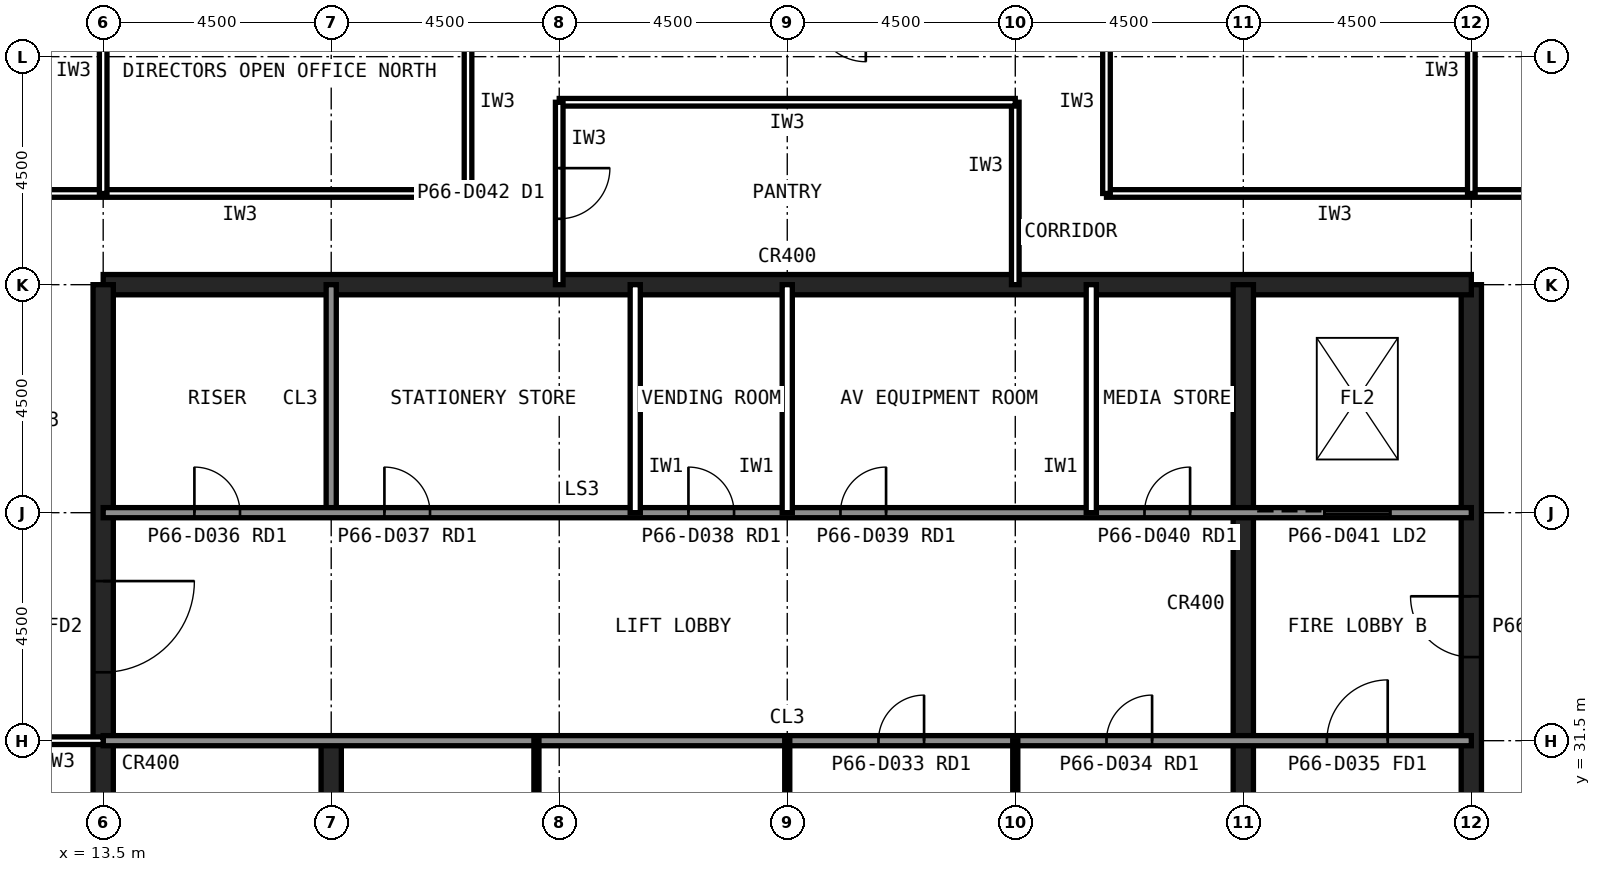
"""IFC4 building model, lengths in metres.
Left out: names, types, materials, properties, quantities, classifications, styles, units other than length and angle.
Written with IfcOpenShell. Run it as: python <this file> out.ifc"""

import sys

from ifc_helpers import new_model, si_unit, direction, frame, frame_2d, origin, place, context, subcontext, project, spatial, rectangle, extrude, element, fill, save


model = new_model("IFC4")
c1 = context("Model", 3, precision=1e-05, world=origin(), true_north=direction((0.0, 1.0)))
c2 = subcontext(c1, "Body", "Model", "MODEL_VIEW")
j1 = project(units=[si_unit("LENGTHUNIT", "METRE"), si_unit("PLANEANGLEUNIT", "RADIAN")], contexts=[c1])
p1 = place(None, origin())
s1 = spatial("IfcSite", under=j1, at=p1, CompositionType="ELEMENT")
p2 = place(p1, origin())
s2 = spatial("IfcBuilding", under=s1, at=p2, CompositionType="ELEMENT")
p3 = place(p2, frame((0.0, 0.0, 278.6)))
s3 = spatial("IfcBuildingStorey", under=s2, at=p3, CompositionType="ELEMENT", Elevation=278.6)
p4 = place(p3, frame((40.5, 13.5, 0.0), z_axis=(0.0, 0.0, 1.0), x_axis=(0.0, 1.0, 0.0)))
e1 = element("IfcWall", 1, at=p4, inside=s3, PredefinedType="SHEAR", context=c2, shape_type="SweptSolid", body=[
    extrude(rectangle(XDim=27.0, YDim=0.4, at=frame_2d((13.5, 0.0))), origin(), (0.0, 0.0, 1.0), 4.0),
])
p5 = place(p4, frame((5.85, 0.0, 0.0)))
e2 = element("IfcOpeningElement", 2, at=p5, cuts=e1, PredefinedType="OPENING", context=c2, shape_type="SweptSolid", body=[
    extrude(rectangle(XDim=1.8, YDim=2.1, at=frame_2d((0.9, 1.05))), frame((0.0, 0.21, 0.0), z_axis=(0.0, -1.0, 0.0), x_axis=(1.0, 0.0, 0.0)), (0.0, 0.0, 1.0), 0.42),
])
p6 = place(p4, frame((19.65, 0.0, 0.0)))
e3 = element("IfcOpeningElement", 3, at=p6, cuts=e1, PredefinedType="OPENING", context=c2, shape_type="SweptSolid", body=[
    extrude(rectangle(XDim=1.2, YDim=2.1, at=frame_2d((0.6, 1.05))), frame((0.0, 0.21, 0.0), z_axis=(0.0, -1.0, 0.0), x_axis=(1.0, 0.0, 0.0)), (0.0, 0.0, 1.0), 0.42),
])
p7 = place(p3, frame((40.5, 40.5, 0.0), z_axis=(0.0, 0.0, 1.0), x_axis=(-1.0, 0.0, 0.0)))
e4 = element("IfcWall", 4, at=p7, inside=s3, PredefinedType="SHEAR", context=c2, shape_type="SweptSolid", body=[
    extrude(rectangle(XDim=27.0, YDim=0.4, at=frame_2d((13.5, 0.0))), origin(), (0.0, 0.0, 1.0), 4.0),
])
p8 = place(p3, frame((13.5, 40.5, 0.0), z_axis=(0.0, 0.0, 1.0), x_axis=(0.0, -1.0, 0.0)))
e5 = element("IfcWall", 5, at=p8, inside=s3, PredefinedType="SHEAR", context=c2, shape_type="SweptSolid", body=[
    extrude(rectangle(XDim=27.0, YDim=0.4, at=frame_2d((13.5, 0.0))), origin(), (0.0, 0.0, 1.0), 4.0),
])
p9 = place(p8, frame((19.65, 0.0, 0.0)))
e6 = element("IfcOpeningElement", 6, at=p9, cuts=e5, PredefinedType="OPENING", context=c2, shape_type="SweptSolid", body=[
    extrude(rectangle(XDim=1.2, YDim=2.1, at=frame_2d((0.6, 1.05))), frame((0.0, 0.21, 0.0), z_axis=(0.0, -1.0, 0.0), x_axis=(1.0, 0.0, 0.0)), (0.0, 0.0, 1.0), 0.42),
])
p10 = place(p8, frame((5.85, 0.0, 0.0)))
e7 = element("IfcOpeningElement", 7, at=p10, cuts=e5, PredefinedType="OPENING", context=c2, shape_type="SweptSolid", body=[
    extrude(rectangle(XDim=1.8, YDim=2.1, at=frame_2d((0.9, 1.05))), frame((0.0, 0.21, 0.0), z_axis=(0.0, -1.0, 0.0), x_axis=(1.0, 0.0, 0.0)), (0.0, 0.0, 1.0), 0.42),
])
p11 = place(p3, frame((18.0, 13.5, 0.0), z_axis=(0.0, 0.0, 1.0), x_axis=(0.0, 1.0, 0.0)))
e8 = element("IfcWall", 8, at=p11, inside=s3, PredefinedType="SHEAR", context=c2, shape_type="SweptSolid", body=[
    extrude(rectangle(XDim=18.0, YDim=0.4, at=frame_2d((9.0, 0.0))), origin(), (0.0, 0.0, 1.0), 4.0),
])
p12 = place(p3, frame((18.0, 36.0, 0.0), z_axis=(0.0, 0.0, 1.0), x_axis=(0.0, 1.0, 0.0)))
e9 = element("IfcWall", 9, at=p12, inside=s3, PredefinedType="SOLIDWALL", context=c2, shape_type="SweptSolid", body=[
    extrude(rectangle(XDim=4.5, YDim=0.2, at=frame_2d((2.25, 0.0))), origin(), (0.0, 0.0, 1.0), 3.84),
])
p13 = place(p3, frame((36.0, 22.5, 0.0), z_axis=(0.0, 0.0, 1.0), x_axis=(0.0, 1.0, 0.0)))
e10 = element("IfcWall", 10, at=p13, inside=s3, PredefinedType="SHEAR", context=c2, shape_type="SweptSolid", body=[
    extrude(rectangle(XDim=18.0, YDim=0.4, at=frame_2d((9.0, 0.0))), origin(), (0.0, 0.0, 1.0), 4.0),
])
p14 = place(p3, frame((13.5, 36.0, 0.0), z_axis=(0.0, 0.0, 1.0), x_axis=(1.0, 0.0, 0.0)))
e11 = element("IfcWall", 11, at=p14, inside=s3, PredefinedType="SOLIDWALL", context=c2, shape_type="SweptSolid", body=[
    extrude(rectangle(XDim=27.0, YDim=0.2, at=frame_2d((13.5, 0.0))), origin(), (0.0, 0.0, 1.0), 3.84),
])
p15 = place(p14, frame((1.8, 0.0, 0.0)))
e12 = element("IfcOpeningElement", 12, at=p15, cuts=e11, PredefinedType="OPENING", context=c2, shape_type="SweptSolid", body=[
    extrude(rectangle(XDim=0.9, YDim=2.1, at=frame_2d((0.45, 1.05))), frame((0.0, 0.11, 0.0), z_axis=(0.0, -1.0, 0.0), x_axis=(1.0, 0.0, 0.0)), (0.0, 0.0, 1.0), 0.22),
])
p16 = place(p14, frame((5.55, 0.0, 0.0)))
e13 = element("IfcOpeningElement", 13, at=p16, cuts=e11, PredefinedType="OPENING", context=c2, shape_type="SweptSolid", body=[
    extrude(rectangle(XDim=0.9, YDim=2.1, at=frame_2d((0.45, 1.05))), frame((0.0, 0.11, 0.0), z_axis=(0.0, -1.0, 0.0), x_axis=(1.0, 0.0, 0.0)), (0.0, 0.0, 1.0), 0.22),
])
p17 = place(p14, frame((11.55, 0.0, 0.0)))
e14 = element("IfcOpeningElement", 14, at=p17, cuts=e11, PredefinedType="OPENING", context=c2, shape_type="SweptSolid", body=[
    extrude(rectangle(XDim=0.9, YDim=2.1, at=frame_2d((0.45, 1.05))), frame((0.0, 0.11, 0.0), z_axis=(0.0, -1.0, 0.0), x_axis=(1.0, 0.0, 0.0)), (0.0, 0.0, 1.0), 0.22),
])
p18 = place(p14, frame((14.55, 0.0, 0.0)))
e15 = element("IfcOpeningElement", 15, at=p18, cuts=e11, PredefinedType="OPENING", context=c2, shape_type="SweptSolid", body=[
    extrude(rectangle(XDim=0.9, YDim=2.1, at=frame_2d((0.45, 1.05))), frame((0.0, 0.11, 0.0), z_axis=(0.0, -1.0, 0.0), x_axis=(1.0, 0.0, 0.0)), (0.0, 0.0, 1.0), 0.22),
])
p19 = place(p14, frame((20.55, 0.0, 0.0)))
e16 = element("IfcOpeningElement", 16, at=p19, cuts=e11, PredefinedType="OPENING", context=c2, shape_type="SweptSolid", body=[
    extrude(rectangle(XDim=0.9, YDim=2.1, at=frame_2d((0.45, 1.05))), frame((0.0, 0.11, 0.0), z_axis=(0.0, -1.0, 0.0), x_axis=(1.0, 0.0, 0.0)), (0.0, 0.0, 1.0), 0.22),
])
p20 = place(p14, frame((24.1, 0.0, 0.0)))
e17 = element("IfcOpeningElement", 17, at=p20, cuts=e11, PredefinedType="OPENING", context=c2, shape_type="SweptSolid", body=[
    extrude(rectangle(XDim=1.3, YDim=2.2, at=frame_2d((0.65, 1.1))), frame((0.0, 0.11, 0.0), z_axis=(0.0, -1.0, 0.0), x_axis=(1.0, 0.0, 0.0)), (0.0, 0.0, 1.0), 0.22),
])
p21 = place(p3, frame((13.5, 31.5, 0.0), z_axis=(0.0, 0.0, 1.0), x_axis=(1.0, 0.0, 0.0)))
e18 = element("IfcWall", 18, at=p21, inside=s3, PredefinedType="SOLIDWALL", context=c2, shape_type="SweptSolid", body=[
    extrude(rectangle(XDim=27.0, YDim=0.2, at=frame_2d((13.5, 0.0))), origin(), (0.0, 0.0, 1.0), 3.84),
])
p22 = place(p21, frame((24.15, 0.0, 0.0)))
e19 = element("IfcOpeningElement", 19, at=p22, cuts=e18, PredefinedType="OPENING", context=c2, shape_type="SweptSolid", body=[
    extrude(rectangle(XDim=1.2, YDim=2.1, at=frame_2d((0.6, 1.05))), frame((0.0, 0.11, 0.0), z_axis=(0.0, -1.0, 0.0), x_axis=(1.0, 0.0, 0.0)), (0.0, 0.0, 1.0), 0.22),
])
p23 = place(p21, frame((15.3, 0.0, 0.0)))
e20 = element("IfcOpeningElement", 20, at=p23, cuts=e18, PredefinedType="OPENING", context=c2, shape_type="SweptSolid", body=[
    extrude(rectangle(XDim=0.9, YDim=2.1, at=frame_2d((0.45, 1.05))), frame((0.0, 0.11, 0.0), z_axis=(0.0, -1.0, 0.0), x_axis=(1.0, 0.0, 0.0)), (0.0, 0.0, 1.0), 0.22),
])
p24 = place(p21, frame((19.8, 0.0, 0.0)))
e21 = element("IfcOpeningElement", 21, at=p24, cuts=e18, PredefinedType="OPENING", context=c2, shape_type="SweptSolid", body=[
    extrude(rectangle(XDim=0.9, YDim=2.1, at=frame_2d((0.45, 1.05))), frame((0.0, 0.11, 0.0), z_axis=(0.0, -1.0, 0.0), x_axis=(1.0, 0.0, 0.0)), (0.0, 0.0, 1.0), 0.22),
])
for number, where, z_axis, x_axis in (
    (22, (24.0, 36.0, 0.0), (0.0, 0.0, 1.0), (0.0, 1.0, 0.0)),
    (23, (27.0, 36.0, 0.0), (0.0, 0.0, 1.0), (0.0, 1.0, 0.0)),
    (24, (33.0, 36.0, 0.0), (0.0, 0.0, 1.0), (0.0, 1.0, 0.0)),
):
    element("IfcWall", number, at=place(p3, frame(where, z_axis=z_axis, x_axis=x_axis)), inside=s3, PredefinedType="PARTITIONING", context=c2, shape_type="SweptSolid", body=[
        extrude(rectangle(XDim=4.5, YDim=0.2, at=frame_2d((2.25, 0.0))), origin(), (0.0, 0.0, 1.0), 3.84),
    ])
for number, where, z_axis, x_axis in (
    (25, (22.05, 22.5, 0.0), (0.0, 0.0, 1.0), (0.0, 1.0, 0.0)),
    (26, (27.0, 22.5, 0.0), (0.0, 0.0, 1.0), (0.0, 1.0, 0.0)),
    (27, (31.5, 22.5, 0.0), (0.0, 0.0, 1.0), (0.0, 1.0, 0.0)),
):
    element("IfcWall", number, at=place(p3, frame(where, z_axis=z_axis, x_axis=x_axis)), inside=s3, PredefinedType="PLUMBINGWALL", context=c2, shape_type="SweptSolid", body=[
        extrude(rectangle(XDim=9.0, YDim=0.1, at=frame_2d((4.5, 0.0))), origin(), (0.0, 0.0, 1.0), 3.84),
    ])
for number, where, z_axis, x_axis in (
    (28, (20.7, 42.3, 0.0), (0.0, 0.0, 1.0), (-1.0, 0.0, 0.0)),
    (29, (42.3, 42.3, 0.0), (0.0, 0.0, 1.0), (-1.0, 0.0, 0.0)),
):
    element("IfcWall", number, at=place(p3, frame(where, z_axis=z_axis, x_axis=x_axis)), inside=s3, PredefinedType="PARTITIONING", context=c2, shape_type="SweptSolid", body=[
        extrude(rectangle(XDim=9.0, YDim=0.15, at=frame_2d((4.5, 0.0))), origin(), (0.0, 0.0, 1.0), 3.84),
    ])
for number, where, z_axis, x_axis in (
    (30, (20.7, 45.9, 0.0), (0.0, 0.0, 1.0), (0.0, -1.0, 0.0)),
    (31, (33.3, 42.3, 0.0), (0.0, 0.0, 1.0), (0.0, 1.0, 0.0)),
):
    element("IfcWall", number, at=place(p3, frame(where, z_axis=z_axis, x_axis=x_axis)), inside=s3, PredefinedType="PARTITIONING", context=c2, shape_type="SweptSolid", body=[
        extrude(rectangle(XDim=3.6, YDim=0.15, at=frame_2d((1.8, 0.0))), origin(), (0.0, 0.0, 1.0), 3.84),
    ])
p25 = place(p3, frame((13.5, 31.5, 0.0), z_axis=(0.0, 0.0, 1.0), x_axis=(-1.0, 0.0, 0.0)))
e32 = element("IfcWall", 32, at=p25, inside=s3, PredefinedType="PARTITIONING", context=c2, shape_type="SweptSolid", body=[
    extrude(rectangle(XDim=4.5, YDim=0.15, at=frame_2d((2.25, 0.0))), origin(), (0.0, 0.0, 1.0), 2.989),
])
p26 = place(p25, frame((1.75, 0.0, 0.0)))
e33 = element("IfcOpeningElement", 33, at=p26, cuts=e32, PredefinedType="OPENING", context=c2, shape_type="SweptSolid", body=[
    extrude(rectangle(XDim=1.0, YDim=2.1, at=frame_2d((0.5, 1.05))), frame((0.0, 0.085, 0.0), z_axis=(0.0, -1.0, 0.0), x_axis=(1.0, 0.0, 0.0)), (0.0, 0.0, 1.0), 0.17),
])
p27 = place(p3, frame((31.5, 40.5, 0.0), z_axis=(0.0, 0.0, 1.0), x_axis=(0.0, 1.0, 0.0)))
e34 = element("IfcWall", 34, at=p27, inside=s3, PredefinedType="PARTITIONING", context=c2, shape_type="SweptSolid", body=[
    extrude(rectangle(XDim=3.6, YDim=0.15, at=frame_2d((1.8, 0.0))), origin(), (0.0, 0.0, 1.0), 2.989),
])
p28 = place(p3, frame((31.5, 44.1, 0.0), z_axis=(0.0, 0.0, 1.0), x_axis=(-1.0, 0.0, 0.0)))
e35 = element("IfcWall", 35, at=p28, inside=s3, PredefinedType="PARTITIONING", context=c2, shape_type="SweptSolid", body=[
    extrude(rectangle(XDim=9.0, YDim=0.15, at=frame_2d((4.5, 0.0))), origin(), (0.0, 0.0, 1.0), 3.84),
])
p29 = place(p3, frame((22.5, 44.1, 0.0), z_axis=(0.0, 0.0, 1.0), x_axis=(0.0, -1.0, 0.0)))
e36 = element("IfcWall", 36, at=p29, inside=s3, PredefinedType="PARTITIONING", context=c2, shape_type="SweptSolid", body=[
    extrude(rectangle(XDim=3.6, YDim=0.15, at=frame_2d((1.8, 0.0))), origin(), (0.0, 0.0, 1.0), 2.989),
])
p30 = place(p29, frame((1.3, 0.0, 0.0)))
e37 = element("IfcOpeningElement", 37, at=p30, cuts=e36, PredefinedType="OPENING", context=c2, shape_type="SweptSolid", body=[
    extrude(rectangle(XDim=1.0, YDim=2.1, at=frame_2d((0.5, 1.05))), frame((0.0, 0.085, 0.0), z_axis=(0.0, -1.0, 0.0), x_axis=(1.0, 0.0, 0.0)), (0.0, 0.0, 1.0), 0.17),
])
p31 = place(p3, frame((13.5, 42.3, 0.0), z_axis=(0.0, 0.0, 1.0), x_axis=(0.0, 1.0, 0.0)))
e38 = element("IfcWall", 38, at=p31, inside=s3, PredefinedType="PARTITIONING", context=c2, shape_type="SweptSolid", body=[
    extrude(rectangle(XDim=6.88, YDim=0.15, at=frame_2d((3.44, 0.0))), origin(), (0.0, 0.0, 1.0), 2.989),
])
p32 = place(p31, frame((2.94, 0.0, 0.0)))
e39 = element("IfcOpeningElement", 39, at=p32, cuts=e38, PredefinedType="OPENING", context=c2, shape_type="SweptSolid", body=[
    extrude(rectangle(XDim=1.0, YDim=2.1, at=frame_2d((0.5, 1.05))), frame((0.0, 0.085, 0.0), z_axis=(0.0, -1.0, 0.0), x_axis=(1.0, 0.0, 0.0)), (0.0, 0.0, 1.0), 0.17),
])
p33 = place(p3, frame((40.5, 42.3, 0.0), z_axis=(0.0, 0.0, 1.0), x_axis=(0.0, 1.0, 0.0)))
e40 = element("IfcWall", 40, at=p33, inside=s3, PredefinedType="PARTITIONING", context=c2, shape_type="SweptSolid", body=[
    extrude(rectangle(XDim=6.88, YDim=0.15, at=frame_2d((3.44, 0.0))), origin(), (0.0, 0.0, 1.0), 2.989),
])
p34 = place(p33, frame((2.94, 0.0, 0.0)))
e41 = element("IfcOpeningElement", 41, at=p34, cuts=e40, PredefinedType="OPENING", context=c2, shape_type="SweptSolid", body=[
    extrude(rectangle(XDim=1.0, YDim=2.1, at=frame_2d((0.5, 1.05))), frame((0.0, 0.085, 0.0), z_axis=(0.0, -1.0, 0.0), x_axis=(1.0, 0.0, 0.0)), (0.0, 0.0, 1.0), 0.17),
])
p35 = place(p10, origin())
e42 = element("IfcDoor", 42, at=p35, inside=s3, OperationType="SINGLE_SWING_LEFT", PredefinedType="DOOR", context=c2, shape_type="SweptSolid", body=[
    extrude(rectangle(XDim=1.8, YDim=2.1, at=frame_2d((0.9, 1.05))), frame((0.0, 0.025, 0.0), z_axis=(0.0, -1.0, 0.0), x_axis=(1.0, 0.0, 0.0)), (0.0, 0.0, 1.0), 0.05),
])
fill(e7, e42)
p36 = place(p6, origin())
e43 = element("IfcDoor", 43, at=p36, inside=s3, OperationType="SINGLE_SWING_RIGHT", PredefinedType="DOOR", context=c2, shape_type="SweptSolid", body=[
    extrude(rectangle(XDim=1.2, YDim=2.1, at=frame_2d((0.6, 1.05))), frame((0.0, 0.025, 0.0), z_axis=(0.0, -1.0, 0.0), x_axis=(1.0, 0.0, 0.0)), (0.0, 0.0, 1.0), 0.05),
])
fill(e3, e43)
p37 = place(p22, origin())
e44 = element("IfcDoor", 44, at=p37, inside=s3, OperationType="SINGLE_SWING_RIGHT", PredefinedType="DOOR", context=c2, shape_type="SweptSolid", body=[
    extrude(rectangle(XDim=1.2, YDim=2.1, at=frame_2d((0.6, 1.05))), frame((0.0, 0.025, 0.0), z_axis=(0.0, -1.0, 0.0), x_axis=(1.0, 0.0, 0.0)), (0.0, 0.0, 1.0), 0.05),
])
fill(e19, e44)
p38 = place(p23, origin())
e45 = element("IfcDoor", 45, at=p38, inside=s3, OperationType="SINGLE_SWING_RIGHT", PredefinedType="DOOR", context=c2, shape_type="SweptSolid", body=[
    extrude(rectangle(XDim=0.9, YDim=2.1, at=frame_2d((0.45, 1.05))), frame((0.0, 0.025, 0.0), z_axis=(0.0, -1.0, 0.0), x_axis=(1.0, 0.0, 0.0)), (0.0, 0.0, 1.0), 0.05),
])
fill(e20, e45)
p39 = place(p24, origin())
e46 = element("IfcDoor", 46, at=p39, inside=s3, OperationType="SINGLE_SWING_RIGHT", PredefinedType="DOOR", context=c2, shape_type="SweptSolid", body=[
    extrude(rectangle(XDim=0.9, YDim=2.1, at=frame_2d((0.45, 1.05))), frame((0.0, 0.025, 0.0), z_axis=(0.0, -1.0, 0.0), x_axis=(1.0, 0.0, 0.0)), (0.0, 0.0, 1.0), 0.05),
])
fill(e21, e46)
p40 = place(p15, origin())
e47 = element("IfcDoor", 47, at=p40, inside=s3, OperationType="SINGLE_SWING_LEFT", PredefinedType="DOOR", context=c2, shape_type="SweptSolid", body=[
    extrude(rectangle(XDim=0.9, YDim=2.1, at=frame_2d((0.45, 1.05))), frame((0.0, 0.025, 0.0), z_axis=(0.0, -1.0, 0.0), x_axis=(1.0, 0.0, 0.0)), (0.0, 0.0, 1.0), 0.05),
])
fill(e12, e47)
p41 = place(p16, origin())
e48 = element("IfcDoor", 48, at=p41, inside=s3, OperationType="SINGLE_SWING_LEFT", PredefinedType="DOOR", context=c2, shape_type="SweptSolid", body=[
    extrude(rectangle(XDim=0.9, YDim=2.1, at=frame_2d((0.45, 1.05))), frame((0.0, 0.025, 0.0), z_axis=(0.0, -1.0, 0.0), x_axis=(1.0, 0.0, 0.0)), (0.0, 0.0, 1.0), 0.05),
])
fill(e13, e48)
p42 = place(p17, origin())
e49 = element("IfcDoor", 49, at=p42, inside=s3, OperationType="SINGLE_SWING_LEFT", PredefinedType="DOOR", context=c2, shape_type="SweptSolid", body=[
    extrude(rectangle(XDim=0.9, YDim=2.1, at=frame_2d((0.45, 1.05))), frame((0.0, 0.025, 0.0), z_axis=(0.0, -1.0, 0.0), x_axis=(1.0, 0.0, 0.0)), (0.0, 0.0, 1.0), 0.05),
])
fill(e14, e49)
p43 = place(p18, origin())
e50 = element("IfcDoor", 50, at=p43, inside=s3, OperationType="SINGLE_SWING_RIGHT", PredefinedType="DOOR", context=c2, shape_type="SweptSolid", body=[
    extrude(rectangle(XDim=0.9, YDim=2.1, at=frame_2d((0.45, 1.05))), frame((0.0, 0.025, 0.0), z_axis=(0.0, -1.0, 0.0), x_axis=(1.0, 0.0, 0.0)), (0.0, 0.0, 1.0), 0.05),
])
fill(e15, e50)
p44 = place(p19, origin())
e51 = element("IfcDoor", 51, at=p44, inside=s3, OperationType="SINGLE_SWING_RIGHT", PredefinedType="DOOR", context=c2, shape_type="SweptSolid", body=[
    extrude(rectangle(XDim=0.9, YDim=2.1, at=frame_2d((0.45, 1.05))), frame((0.0, 0.025, 0.0), z_axis=(0.0, -1.0, 0.0), x_axis=(1.0, 0.0, 0.0)), (0.0, 0.0, 1.0), 0.05),
])
fill(e16, e51)
p45 = place(p20, origin())
e52 = element("IfcDoor", 52, at=p45, inside=s3, OperationType="SLIDING_TO_LEFT", PredefinedType="DOOR", context=c2, shape_type="SweptSolid", body=[
    extrude(rectangle(XDim=1.3, YDim=2.2, at=frame_2d((0.65, 1.1))), frame((0.0, 0.025, 0.0), z_axis=(0.0, -1.0, 0.0), x_axis=(1.0, 0.0, 0.0)), (0.0, 0.0, 1.0), 0.05),
])
fill(e17, e52)
p46 = place(p30, origin())
e53 = element("IfcDoor", 53, at=p46, inside=s3, OperationType="SINGLE_SWING_LEFT", PredefinedType="DOOR", context=c2, shape_type="SweptSolid", body=[
    extrude(rectangle(XDim=1.0, YDim=2.1, at=frame_2d((0.5, 1.05))), frame((0.0, 0.025, 0.0), z_axis=(0.0, -1.0, 0.0), x_axis=(1.0, 0.0, 0.0)), (0.0, 0.0, 1.0), 0.05),
])
fill(e37, e53)
save(model, sys.argv[1])
